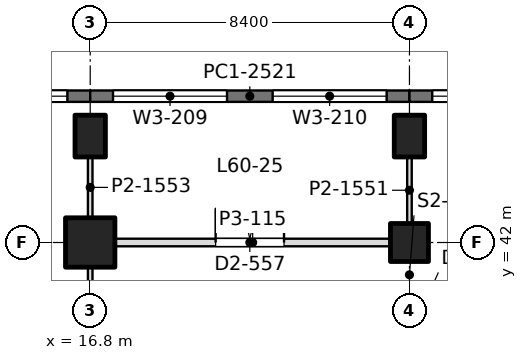
"""IFC4 building model, lengths in metres.
Left out: names, types, materials, properties, quantities, classifications, styles, units other than length and angle.
Written with IfcOpenShell. Run it as: python <this file> out.ifc"""

import sys

from ifc_helpers import new_model, si_unit, direction, frame, frame_2d, origin, origin_2d, place, context, subcontext, project, spatial, rectangle, extrude, element, fill, save


model = new_model("IFC4")
c1 = context("Model", 3, precision=1e-05, world=origin(), true_north=direction((0.0, 1.0)))
c2 = subcontext(c1, "Body", "Model", "MODEL_VIEW")
j1 = project(units=[si_unit("LENGTHUNIT", "METRE"), si_unit("PLANEANGLEUNIT", "RADIAN")], contexts=[c1])
p1 = place(None, origin())
s1 = spatial("IfcSite", under=j1, at=p1, CompositionType="ELEMENT")
p2 = place(p1, origin())
s2 = spatial("IfcBuilding", under=s1, at=p2, CompositionType="ELEMENT")
p3 = place(p2, frame((0.0, 0.0, 263.7)))
s3 = spatial("IfcBuildingStorey", under=s2, at=p3, CompositionType="ELEMENT", Elevation=263.7)
p4 = place(p3, frame((16.8, 42.0, 0.0), z_axis=(0.0, 0.0, 1.0), x_axis=(1.0, 0.0, 0.0)))
e1 = element("IfcColumn", 1, at=p4, inside=s3, PredefinedType="COLUMN", context=c2, shape_type="SweptSolid", body=[
    extrude(rectangle(XDim=1.3, YDim=1.3, at=origin_2d()), origin(), (0.0, 0.0, 1.0), 4.5),
])
p5 = place(p3, frame((16.8, 44.8, 0.0), z_axis=(0.0, 0.0, 1.0), x_axis=(1.0, 0.0, 0.0)))
e2 = element("IfcColumn", 2, at=p5, inside=s3, PredefinedType="COLUMN", context=c2, shape_type="SweptSolid", body=[
    extrude(rectangle(XDim=0.8, YDim=1.1, at=origin_2d()), origin(), (0.0, 0.0, 1.0), 4.5),
])
p6 = place(p3, frame((25.2, 42.0, 0.0), z_axis=(0.0, 0.0, 1.0), x_axis=(1.0, 0.0, 0.0)))
e3 = element("IfcColumn", 3, at=p6, inside=s3, PredefinedType="COLUMN", context=c2, shape_type="SweptSolid", body=[
    extrude(rectangle(XDim=1.0, YDim=1.0, at=origin_2d()), origin(), (0.0, 0.0, 1.0), 4.5),
])
p7 = place(p3, frame((25.2, 44.8, 0.0), z_axis=(0.0, 0.0, 1.0), x_axis=(1.0, 0.0, 0.0)))
e4 = element("IfcColumn", 4, at=p7, inside=s3, PredefinedType="COLUMN", context=c2, shape_type="SweptSolid", body=[
    extrude(rectangle(XDim=0.8, YDim=1.1, at=origin_2d()), origin(), (0.0, 0.0, 1.0), 4.5),
])
p8 = place(p3, frame((8.4, 45.85, 0.0), z_axis=(0.0, 0.0, 1.0), x_axis=(1.0, 0.0, 0.0)))
e5 = element("IfcWall", 5, at=p8, inside=s3, PredefinedType="SOLIDWALL", context=c2, shape_type="SweptSolid", body=[
    extrude(rectangle(XDim=8.4, YDim=0.3, at=frame_2d((4.2, 0.0))), origin(), (0.0, 0.0, 1.0), 4.35),
])
p9 = place(p8, frame((0.6, 0.0, 0.9)))
e6 = element("IfcOpeningElement", 6, at=p9, cuts=e5, PredefinedType="OPENING", context=c2, shape_type="SweptSolid", body=[
    extrude(rectangle(XDim=3.0, YDim=2.4, at=frame_2d((1.5, 1.2))), frame((0.0, 0.16, 0.0), z_axis=(0.0, -1.0, 0.0), x_axis=(1.0, 0.0, 0.0)), (0.0, 0.0, 1.0), 0.32),
])
p10 = place(p8, frame((4.8, 0.0, 0.9)))
e7 = element("IfcOpeningElement", 7, at=p10, cuts=e5, PredefinedType="OPENING", context=c2, shape_type="SweptSolid", body=[
    extrude(rectangle(XDim=3.0, YDim=2.4, at=frame_2d((1.5, 1.2))), frame((0.0, 0.16, 0.0), z_axis=(0.0, -1.0, 0.0), x_axis=(1.0, 0.0, 0.0)), (0.0, 0.0, 1.0), 0.32),
])
p11 = place(p3, frame((16.8, 45.85, 0.0), z_axis=(0.0, 0.0, 1.0), x_axis=(1.0, 0.0, 0.0)))
e8 = element("IfcWall", 8, at=p11, inside=s3, PredefinedType="SOLIDWALL", context=c2, shape_type="SweptSolid", body=[
    extrude(rectangle(XDim=8.4, YDim=0.3, at=frame_2d((4.2, 0.0))), origin(), (0.0, 0.0, 1.0), 4.35),
])
p12 = place(p11, frame((0.6, 0.0, 0.9)))
e9 = element("IfcOpeningElement", 9, at=p12, cuts=e8, PredefinedType="OPENING", context=c2, shape_type="SweptSolid", body=[
    extrude(rectangle(XDim=3.0, YDim=2.4, at=frame_2d((1.5, 1.2))), frame((0.0, 0.16, 0.0), z_axis=(0.0, -1.0, 0.0), x_axis=(1.0, 0.0, 0.0)), (0.0, 0.0, 1.0), 0.32),
])
p13 = place(p11, frame((4.8, 0.0, 0.9)))
e10 = element("IfcOpeningElement", 10, at=p13, cuts=e8, PredefinedType="OPENING", context=c2, shape_type="SweptSolid", body=[
    extrude(rectangle(XDim=3.0, YDim=2.4, at=frame_2d((1.5, 1.2))), frame((0.0, 0.16, 0.0), z_axis=(0.0, -1.0, 0.0), x_axis=(1.0, 0.0, 0.0)), (0.0, 0.0, 1.0), 0.32),
])
p14 = place(p3, frame((25.2, 45.85, 0.0), z_axis=(0.0, 0.0, 1.0), x_axis=(1.0, 0.0, 0.0)))
e11 = element("IfcWall", 11, at=p14, inside=s3, PredefinedType="SOLIDWALL", context=c2, shape_type="SweptSolid", body=[
    extrude(rectangle(XDim=8.4, YDim=0.3, at=frame_2d((4.2, 0.0))), origin(), (0.0, 0.0, 1.0), 4.35),
])
p15 = place(p14, frame((0.6, 0.0, 0.9)))
e12 = element("IfcOpeningElement", 12, at=p15, cuts=e11, PredefinedType="OPENING", context=c2, shape_type="SweptSolid", body=[
    extrude(rectangle(XDim=3.0, YDim=2.4, at=frame_2d((1.5, 1.2))), frame((0.0, 0.16, 0.0), z_axis=(0.0, -1.0, 0.0), x_axis=(1.0, 0.0, 0.0)), (0.0, 0.0, 1.0), 0.32),
])
p16 = place(p14, frame((4.8, 0.0, 0.9)))
e13 = element("IfcOpeningElement", 13, at=p16, cuts=e11, PredefinedType="OPENING", context=c2, shape_type="SweptSolid", body=[
    extrude(rectangle(XDim=3.0, YDim=2.4, at=frame_2d((1.5, 1.2))), frame((0.0, 0.16, 0.0), z_axis=(0.0, -1.0, 0.0), x_axis=(1.0, 0.0, 0.0)), (0.0, 0.0, 1.0), 0.32),
])
p17 = place(p3, frame((17.449, 42.0, 0.0), z_axis=(0.0, 0.0, 1.0), x_axis=(1.0, 0.0, 0.0)))
e14 = element("IfcWall", 14, at=p17, inside=s3, PredefinedType="PARTITIONING", context=c2, shape_type="SweptSolid", body=[
    extrude(rectangle(XDim=7.252, YDim=0.2, at=frame_2d((3.626, 0.0))), origin(), (0.0, 0.0, 1.0), 3.8),
])
p18 = place(p17, frame((2.651, 0.0, 0.0)))
e15 = element("IfcOpeningElement", 15, at=p18, cuts=e14, PredefinedType="OPENING", context=c2, shape_type="SweptSolid", body=[
    extrude(rectangle(XDim=1.8, YDim=2.2, at=frame_2d((0.9, 1.1))), frame((0.0, 0.11, 0.0), z_axis=(0.0, -1.0, 0.0), x_axis=(1.0, 0.0, 0.0)), (0.0, 0.0, 1.0), 0.22),
])
p19 = place(p3, frame((16.8, 42.649, 0.0), z_axis=(0.0, 0.0, 1.0), x_axis=(0.0, 1.0, 0.0)))
e16 = element("IfcWall", 16, at=p19, inside=s3, PredefinedType="PARTITIONING", context=c2, shape_type="SweptSolid", body=[
    extrude(rectangle(XDim=1.602, YDim=0.12, at=frame_2d((0.801, 0.0))), origin(), (0.0, 0.0, 1.0), 3.99),
])
p20 = place(p3, frame((25.2, 42.499, 0.0), z_axis=(0.0, 0.0, 1.0), x_axis=(0.0, 1.0, 0.0)))
e17 = element("IfcWall", 17, at=p20, inside=s3, PredefinedType="PARTITIONING", context=c2, shape_type="SweptSolid", body=[
    extrude(rectangle(XDim=1.752, YDim=0.12, at=frame_2d((0.876, 0.0))), origin(), (0.0, 0.0, 1.0), 3.99),
])
p21 = place(p3, frame((16.8, 40.098, 0.0), z_axis=(0.0, 0.0, 1.0), x_axis=(0.0, 1.0, 0.0)))
e18 = element("IfcWall", 18, at=p21, inside=s3, PredefinedType="PARTITIONING", context=c2, shape_type="SweptSolid", body=[
    extrude(rectangle(XDim=1.253, YDim=0.12, at=frame_2d((0.626, 0.0))), origin(), (0.0, 0.0, 1.0), 3.99),
])
p22 = place(p10, origin())
e19 = element("IfcWindow", 19, at=p22, inside=s3, PartitioningType="SINGLE_PANEL", PredefinedType="WINDOW", context=c2, shape_type="SweptSolid", body=[
    extrude(rectangle(XDim=3.0, YDim=2.4, at=frame_2d((1.5, 1.2))), frame((0.0, 0.03, 0.0), z_axis=(0.0, -1.0, 0.0), x_axis=(1.0, 0.0, 0.0)), (0.0, 0.0, 1.0), 0.06),
])
fill(e7, e19)
p23 = place(p12, origin())
e20 = element("IfcWindow", 20, at=p23, inside=s3, PartitioningType="SINGLE_PANEL", PredefinedType="WINDOW", context=c2, shape_type="SweptSolid", body=[
    extrude(rectangle(XDim=3.0, YDim=2.4, at=frame_2d((1.5, 1.2))), frame((0.0, 0.03, 0.0), z_axis=(0.0, -1.0, 0.0), x_axis=(1.0, 0.0, 0.0)), (0.0, 0.0, 1.0), 0.06),
])
fill(e9, e20)
p24 = place(p13, origin())
e21 = element("IfcWindow", 21, at=p24, inside=s3, PartitioningType="SINGLE_PANEL", PredefinedType="WINDOW", context=c2, shape_type="SweptSolid", body=[
    extrude(rectangle(XDim=3.0, YDim=2.4, at=frame_2d((1.5, 1.2))), frame((0.0, 0.03, 0.0), z_axis=(0.0, -1.0, 0.0), x_axis=(1.0, 0.0, 0.0)), (0.0, 0.0, 1.0), 0.06),
])
fill(e10, e21)
p25 = place(p15, origin())
e22 = element("IfcWindow", 22, at=p25, inside=s3, PartitioningType="SINGLE_PANEL", PredefinedType="WINDOW", context=c2, shape_type="SweptSolid", body=[
    extrude(rectangle(XDim=3.0, YDim=2.4, at=frame_2d((1.5, 1.2))), frame((0.0, 0.03, 0.0), z_axis=(0.0, -1.0, 0.0), x_axis=(1.0, 0.0, 0.0)), (0.0, 0.0, 1.0), 0.06),
])
fill(e12, e22)
p26 = place(p18, origin())
e23 = element("IfcDoor", 23, at=p26, inside=s3, OperationType="DOUBLE_DOOR_SINGLE_SWING", PredefinedType="DOOR", context=c2, shape_type="SweptSolid", body=[
    extrude(rectangle(XDim=1.8, YDim=2.2, at=frame_2d((0.9, 1.1))), frame((0.0, 0.025, 0.0), z_axis=(0.0, -1.0, 0.0), x_axis=(1.0, 0.0, 0.0)), (0.0, 0.0, 1.0), 0.05),
])
fill(e15, e23)
save(model, sys.argv[1])
